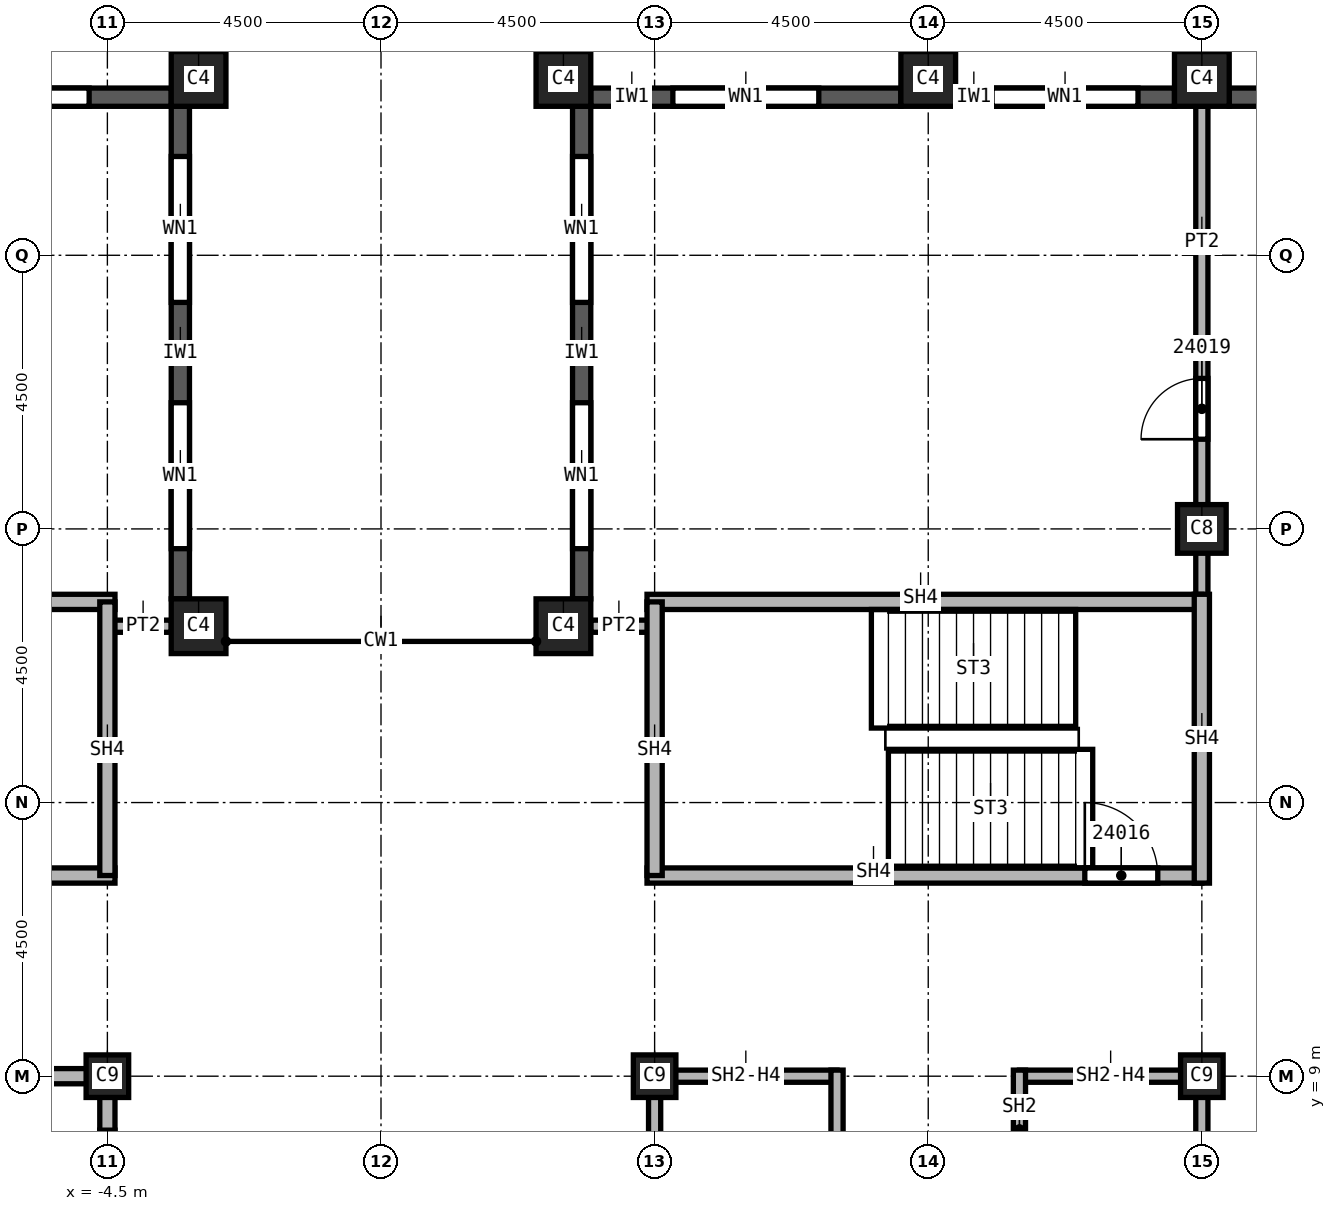
"""IFC4 building model, lengths in metres.
Left out: names, types, materials, properties, quantities, classifications, styles, units other than length and angle.
Written with IfcOpenShell. Run it as: python <this file> out.ifc"""

import sys

from ifc_helpers import new_model, si_unit, direction, frame, frame_2d, origin, origin_2d, place, context, subcontext, project, spatial, rectangle, extrude, element, fill, save


model = new_model("IFC4")
c1 = context("Model", 3, precision=1e-05, world=origin(), true_north=direction((0.0, 1.0)))
c2 = subcontext(c1, "Body", "Model", "MODEL_VIEW")
j1 = project(units=[si_unit("LENGTHUNIT", "METRE"), si_unit("PLANEANGLEUNIT", "RADIAN")], contexts=[c1])
p1 = place(None, origin())
s1 = spatial("IfcSite", under=j1, at=p1, CompositionType="ELEMENT")
p2 = place(p1, origin())
s2 = spatial("IfcBuilding", under=s1, at=p2, CompositionType="ELEMENT")
p3 = place(p2, frame((0.0, 0.0, 342.0)))
s3 = spatial("IfcBuildingStorey", under=s2, at=p3, CompositionType="ELEMENT", Elevation=342.0)
p4 = place(p3, frame((13.5, 18.0, 0.0), z_axis=(0.0, 0.0, 1.0), x_axis=(1.0, 0.0, 0.0)))
e1 = element("IfcColumn", 1, at=p4, inside=s3, PredefinedType="COLUMN", context=c2, shape_type="SweptSolid", body=[
    extrude(rectangle(XDim=0.8, YDim=0.8, at=origin_2d()), origin(), (0.0, 0.0, 1.0), 3.74),
])
for number, where, z_axis, x_axis in (
    (2, (4.5, 9.0, 0.0), (0.0, 0.0, 1.0), (1.0, 0.0, 0.0)),
    (3, (13.5, 9.0, 0.0), (0.0, 0.0, 1.0), (1.0, 0.0, 0.0)),
    (4, (-4.5, 9.0, 0.0), (0.0, 0.0, 1.0), (1.0, 0.0, 0.0)),
):
    element("IfcColumn", number, at=place(p3, frame(where, z_axis=z_axis, x_axis=x_axis)), inside=s3, PredefinedType="COLUMN", context=c2, shape_type="SweptSolid", body=[
        extrude(rectangle(XDim=0.7, YDim=0.7, at=origin_2d()), origin(), (0.0, 0.0, 1.0), 3.74),
    ])
for number, where, z_axis, x_axis in (
    (5, (3.0, 25.4, 0.0), (0.0, 0.0, 1.0), (1.0, 0.0, 0.0)),
    (6, (9.0, 25.4, 0.0), (0.0, 0.0, 1.0), (1.0, 0.0, 0.0)),
    (7, (13.5, 25.4, 0.0), (0.0, 0.0, 1.0), (1.0, 0.0, 0.0)),
    (8, (-3.0, 25.4, 0.0), (0.0, 0.0, 1.0), (1.0, 0.0, 0.0)),
    (9, (3.0, 16.4, 0.0), (0.0, 0.0, 1.0), (1.0, 0.0, 0.0)),
    (10, (-3.0, 16.4, 0.0), (0.0, 0.0, 1.0), (1.0, 0.0, 0.0)),
):
    element("IfcColumn", number, at=place(p3, frame(where, z_axis=z_axis, x_axis=x_axis)), inside=s3, PredefinedType="COLUMN", context=c2, shape_type="SweptSolid", body=[
        extrude(rectangle(XDim=0.9, YDim=0.9, at=origin_2d()), origin(), (0.0, 0.0, 1.0), 3.74),
    ])
p5 = place(p3, frame((17.55, 25.1, 0.0), z_axis=(0.0, 0.0, 1.0), x_axis=(-1.0, 0.0, 0.0)))
e11 = element("IfcWall", 11, at=p5, inside=s3, PredefinedType="SOLIDWALL", context=c2, shape_type="SweptSolid", body=[
    extrude(rectangle(XDim=3.6, YDim=0.3, at=frame_2d((1.8, 0.0))), origin(), (0.0, 0.0, 1.0), 3.14),
])
p6 = place(p5, frame((0.775, 0.0, 0.8)))
e12 = element("IfcOpeningElement", 12, at=p6, cuts=e11, PredefinedType="OPENING", context=c2, shape_type="SweptSolid", body=[
    extrude(rectangle(XDim=1.0, YDim=1.95, at=frame_2d((0.5, 0.975))), frame((0.0, 0.15, 0.0), z_axis=(0.0, -1.0, 0.0), x_axis=(1.0, 0.0, 0.0)), (0.0, 0.0, 1.0), 0.3),
])
p7 = place(p5, frame((2.375, 0.0, 0.8)))
e13 = element("IfcOpeningElement", 13, at=p7, cuts=e11, PredefinedType="OPENING", context=c2, shape_type="SweptSolid", body=[
    extrude(rectangle(XDim=0.6, YDim=1.95, at=frame_2d((0.3, 0.975))), frame((0.0, 0.15, 0.0), z_axis=(0.0, -1.0, 0.0), x_axis=(1.0, 0.0, 0.0)), (0.0, 0.0, 1.0), 0.3),
])
p8 = place(p3, frame((13.05, 25.1, 0.0), z_axis=(0.0, 0.0, 1.0), x_axis=(-1.0, 0.0, 0.0)))
e14 = element("IfcWall", 14, at=p8, inside=s3, PredefinedType="SOLIDWALL", context=c2, shape_type="SweptSolid", body=[
    extrude(rectangle(XDim=3.6, YDim=0.3, at=frame_2d((1.8, 0.0))), origin(), (0.0, 0.0, 1.0), 3.14),
])
p9 = place(p8, frame((0.6, 0.0, 0.8)))
e15 = element("IfcOpeningElement", 15, at=p9, cuts=e14, PredefinedType="OPENING", context=c2, shape_type="SweptSolid", body=[
    extrude(rectangle(XDim=2.4, YDim=1.95, at=frame_2d((1.2, 0.975))), frame((0.0, 0.15, 0.0), z_axis=(0.0, -1.0, 0.0), x_axis=(1.0, 0.0, 0.0)), (0.0, 0.0, 1.0), 0.3),
])
p10 = place(p3, frame((8.55, 25.1, 0.0), z_axis=(0.0, 0.0, 1.0), x_axis=(-1.0, 0.0, 0.0)))
e16 = element("IfcWall", 16, at=p10, inside=s3, PredefinedType="SOLIDWALL", context=c2, shape_type="SweptSolid", body=[
    extrude(rectangle(XDim=5.1, YDim=0.3, at=frame_2d((2.55, 0.0))), origin(), (0.0, 0.0, 1.0), 3.14),
])
p11 = place(p10, frame((1.35, 0.0, 0.8)))
e17 = element("IfcOpeningElement", 17, at=p11, cuts=e16, PredefinedType="OPENING", context=c2, shape_type="SweptSolid", body=[
    extrude(rectangle(XDim=2.4, YDim=1.95, at=frame_2d((1.2, 0.975))), frame((0.0, 0.15, 0.0), z_axis=(0.0, -1.0, 0.0), x_axis=(1.0, 0.0, 0.0)), (0.0, 0.0, 1.0), 0.3),
])
p12 = place(p3, frame((3.3, 24.95, 0.0), z_axis=(0.0, 0.0, 1.0), x_axis=(0.0, -1.0, 0.0)))
e18 = element("IfcWall", 18, at=p12, inside=s3, PredefinedType="SOLIDWALL", context=c2, shape_type="SweptSolid", body=[
    extrude(rectangle(XDim=8.1, YDim=0.3, at=frame_2d((4.05, 0.0))), origin(), (0.0, 0.0, 1.0), 3.14),
])
p13 = place(p12, frame((0.825, 0.0, 0.8)))
e19 = element("IfcOpeningElement", 19, at=p13, cuts=e18, PredefinedType="OPENING", context=c2, shape_type="SweptSolid", body=[
    extrude(rectangle(XDim=2.4, YDim=1.95, at=frame_2d((1.2, 0.975))), frame((0.0, 0.15, 0.0), z_axis=(0.0, -1.0, 0.0), x_axis=(1.0, 0.0, 0.0)), (0.0, 0.0, 1.0), 0.3),
])
p14 = place(p12, frame((4.875, 0.0, 0.8)))
e20 = element("IfcOpeningElement", 20, at=p14, cuts=e18, PredefinedType="OPENING", context=c2, shape_type="SweptSolid", body=[
    extrude(rectangle(XDim=2.4, YDim=1.95, at=frame_2d((1.2, 0.975))), frame((0.0, 0.15, 0.0), z_axis=(0.0, -1.0, 0.0), x_axis=(1.0, 0.0, 0.0)), (0.0, 0.0, 1.0), 0.3),
])
p15 = place(p3, frame((-3.3, 16.85, 0.0), z_axis=(0.0, 0.0, 1.0), x_axis=(0.0, 1.0, 0.0)))
e21 = element("IfcWall", 21, at=p15, inside=s3, PredefinedType="SOLIDWALL", context=c2, shape_type="SweptSolid", body=[
    extrude(rectangle(XDim=8.1, YDim=0.3, at=frame_2d((4.05, 0.0))), origin(), (0.0, 0.0, 1.0), 3.14),
])
p16 = place(p15, frame((0.825, 0.0, 0.8)))
e22 = element("IfcOpeningElement", 22, at=p16, cuts=e21, PredefinedType="OPENING", context=c2, shape_type="SweptSolid", body=[
    extrude(rectangle(XDim=2.4, YDim=1.95, at=frame_2d((1.2, 0.975))), frame((0.0, 0.15, 0.0), z_axis=(0.0, -1.0, 0.0), x_axis=(1.0, 0.0, 0.0)), (0.0, 0.0, 1.0), 0.3),
])
p17 = place(p15, frame((4.875, 0.0, 0.8)))
e23 = element("IfcOpeningElement", 23, at=p17, cuts=e21, PredefinedType="OPENING", context=c2, shape_type="SweptSolid", body=[
    extrude(rectangle(XDim=2.4, YDim=1.95, at=frame_2d((1.2, 0.975))), frame((0.0, 0.15, 0.0), z_axis=(0.0, -1.0, 0.0), x_axis=(1.0, 0.0, 0.0)), (0.0, 0.0, 1.0), 0.3),
])
p18 = place(p3, frame((-3.45, 25.1, 0.0), z_axis=(0.0, 0.0, 1.0), x_axis=(-1.0, 0.0, 0.0)))
e24 = element("IfcWall", 24, at=p18, inside=s3, PredefinedType="SOLIDWALL", context=c2, shape_type="SweptSolid", body=[
    extrude(rectangle(XDim=5.1, YDim=0.3, at=frame_2d((2.55, 0.0))), origin(), (0.0, 0.0, 1.0), 3.14),
])
p19 = place(p18, frame((1.35, 0.0, 0.8)))
e25 = element("IfcOpeningElement", 25, at=p19, cuts=e24, PredefinedType="OPENING", context=c2, shape_type="SweptSolid", body=[
    extrude(rectangle(XDim=2.4, YDim=1.95, at=frame_2d((1.2, 0.975))), frame((0.0, 0.15, 0.0), z_axis=(0.0, -1.0, 0.0), x_axis=(1.0, 0.0, 0.0)), (0.0, 0.0, 1.0), 0.3),
])
for number, where, z_axis, x_axis in (
    (26, (-4.5, 16.4, 0.0), (0.0, 0.0, 1.0), (1.0, 0.0, 0.0)),
    (27, (3.45, 16.4, 0.0), (0.0, 0.0, 1.0), (1.0, 0.0, 0.0)),
):
    element("IfcWall", number, at=place(p3, frame(where, z_axis=z_axis, x_axis=x_axis)), inside=s3, PredefinedType="PARTITIONING", context=c2, shape_type="SweptSolid", body=[
        extrude(rectangle(XDim=1.05, YDim=0.2, at=frame_2d((0.525, 0.0))), origin(), (0.0, 0.0, 1.0), 3.74),
    ])
p20 = place(p3, frame((13.5, 16.675, 0.0), z_axis=(0.0, 0.0, 1.0), x_axis=(0.0, 1.0, 0.0)))
e28 = element("IfcWall", 28, at=p20, inside=s3, PredefinedType="PARTITIONING", context=c2, shape_type="SweptSolid", body=[
    extrude(rectangle(XDim=8.275, YDim=0.2, at=frame_2d((4.137, 0.0))), origin(), (0.0, 0.0, 1.0), 3.74),
])
p21 = place(p20, frame((2.8, 0.0, 0.0)))
e29 = element("IfcOpeningElement", 29, at=p21, cuts=e28, PredefinedType="OPENING", context=c2, shape_type="SweptSolid", body=[
    extrude(rectangle(XDim=1.0, YDim=2.1, at=frame_2d((0.5, 1.05))), frame((0.0, 0.1, 0.0), z_axis=(0.0, -1.0, 0.0), x_axis=(1.0, 0.0, 0.0)), (0.0, 0.0, 1.0), 0.2),
])
p22 = place(p3, frame((4.5, -6.0, 0.0), z_axis=(0.0, 0.0, 1.0), x_axis=(0.0, 1.0, 0.0)))
e30 = element("IfcWall", 30, at=p22, inside=s3, PredefinedType="SOLIDWALL", context=c2, shape_type="SweptSolid", body=[
    extrude(rectangle(XDim=15.1, YDim=0.2, at=frame_2d((7.55, 0.0))), origin(), (0.0, 0.0, 1.0), 3.062),
])
p23 = place(p22, frame((1.6, 0.0, 0.0)))
e31 = element("IfcOpeningElement", 31, at=p23, cuts=e30, PredefinedType="OPENING", context=c2, shape_type="SweptSolid", body=[
    extrude(rectangle(XDim=1.1, YDim=2.1, at=frame_2d((0.55, 1.05))), frame((0.0, 0.1, 0.0), z_axis=(0.0, -1.0, 0.0), x_axis=(1.0, 0.0, 0.0)), (0.0, 0.0, 1.0), 0.2),
])
p24 = place(p22, frame((8.2, 0.0, 0.0)))
e32 = element("IfcOpeningElement", 32, at=p24, cuts=e30, PredefinedType="OPENING", context=c2, shape_type="SweptSolid", body=[
    extrude(rectangle(XDim=1.1, YDim=2.1, at=frame_2d((0.55, 1.05))), frame((0.0, 0.1, 0.0), z_axis=(0.0, -1.0, 0.0), x_axis=(1.0, 0.0, 0.0)), (0.0, 0.0, 1.0), 0.2),
])
p25 = place(p3, frame((4.5, 9.0, 0.0), z_axis=(0.0, 0.0, 1.0), x_axis=(1.0, 0.0, 0.0)))
e33 = element("IfcWall", 33, at=p25, inside=s3, PredefinedType="SOLIDWALL", context=c2, shape_type="SweptSolid", body=[
    extrude(rectangle(XDim=3.0, YDim=0.2, at=frame_2d((1.5, 0.0))), origin(), (0.0, 0.0, 1.0), 3.062),
])
p26 = place(p3, frame((7.5, 9.1, 0.0), z_axis=(0.0, 0.0, 1.0), x_axis=(0.0, -1.0, 0.0)))
e34 = element("IfcWall", 34, at=p26, inside=s3, PredefinedType="SOLIDWALL", context=c2, shape_type="SweptSolid", body=[
    extrude(rectangle(XDim=6.225, YDim=0.2, at=frame_2d((3.113, 0.0))), origin(), (0.0, 0.0, 1.0), 3.74),
])
p27 = place(p3, frame((10.5, 9.0, 0.0), z_axis=(0.0, 0.0, 1.0), x_axis=(1.0, 0.0, 0.0)))
e35 = element("IfcWall", 35, at=p27, inside=s3, PredefinedType="SOLIDWALL", context=c2, shape_type="SweptSolid", body=[
    extrude(rectangle(XDim=3.0, YDim=0.2, at=frame_2d((1.5, 0.0))), origin(), (0.0, 0.0, 1.0), 3.062),
])
p28 = place(p3, frame((10.5, 9.1, 0.0), z_axis=(0.0, 0.0, 1.0), x_axis=(0.0, -1.0, 0.0)))
e36 = element("IfcWall", 36, at=p28, inside=s3, PredefinedType="SOLIDWALL", context=c2, shape_type="SweptSolid", body=[
    extrude(rectangle(XDim=3.225, YDim=0.2, at=frame_2d((1.613, 0.0))), origin(), (0.0, 0.0, 1.0), 3.74),
])
p29 = place(p28, frame((1.75, 0.0, 0.0)))
e37 = element("IfcOpeningElement", 37, at=p29, cuts=e36, PredefinedType="OPENING", context=c2, shape_type="SweptSolid", body=[
    extrude(rectangle(XDim=1.1, YDim=2.1, at=frame_2d((0.55, 1.05))), frame((0.0, 0.1, 0.0), z_axis=(0.0, -1.0, 0.0), x_axis=(1.0, 0.0, 0.0)), (0.0, 0.0, 1.0), 0.2),
])
p30 = place(p3, frame((13.5, 9.1, 0.0), z_axis=(0.0, 0.0, 1.0), x_axis=(0.0, -1.0, 0.0)))
e38 = element("IfcWall", 38, at=p30, inside=s3, PredefinedType="SOLIDWALL", context=c2, shape_type="SweptSolid", body=[
    extrude(rectangle(XDim=3.1, YDim=0.2, at=frame_2d((1.55, 0.0))), origin(), (0.0, 0.0, 1.0), 3.062),
])
p31 = place(p3, frame((-7.5, 9.0, 0.0), z_axis=(0.0, 0.0, 1.0), x_axis=(1.0, 0.0, 0.0)))
e39 = element("IfcWall", 39, at=p31, inside=s3, PredefinedType="SOLIDWALL", context=c2, shape_type="SweptSolid", body=[
    extrude(rectangle(XDim=3.0, YDim=0.25, at=frame_2d((1.5, 0.0))), origin(), (0.0, 0.0, 1.0), 3.062),
])
p32 = place(p3, frame((-4.5, 9.125, 0.0), z_axis=(0.0, 0.0, 1.0), x_axis=(0.0, -1.0, 0.0)))
e40 = element("IfcWall", 40, at=p32, inside=s3, PredefinedType="SOLIDWALL", context=c2, shape_type="SweptSolid", body=[
    extrude(rectangle(XDim=3.125, YDim=0.25, at=frame_2d((1.562, 0.0))), origin(), (0.0, 0.0, 1.0), 3.062),
])
p33 = place(p32, frame((1.012, 0.0, 0.0)))
e41 = element("IfcOpeningElement", 41, at=p33, cuts=e40, PredefinedType="OPENING", context=c2, shape_type="SweptSolid", body=[
    extrude(rectangle(XDim=1.1, YDim=2.1, at=frame_2d((0.55, 1.05))), frame((0.0, 0.125, 0.0), z_axis=(0.0, -1.0, 0.0), x_axis=(1.0, 0.0, 0.0)), (0.0, 0.0, 1.0), 0.25),
])
p34 = place(p3, frame((-13.5, 12.3, 0.0), z_axis=(0.0, 0.0, 1.0), x_axis=(1.0, 0.0, 0.0)))
e42 = element("IfcWall", 42, at=p34, inside=s3, PredefinedType="SOLIDWALL", context=c2, shape_type="SweptSolid", body=[
    extrude(rectangle(XDim=9.125, YDim=0.25, at=frame_2d((4.562, 0.0))), origin(), (0.0, 0.0, 1.0), 3.74),
])
p35 = place(p34, frame((0.6, 0.0, 0.0)))
e43 = element("IfcOpeningElement", 43, at=p35, cuts=e42, PredefinedType="OPENING", context=c2, shape_type="SweptSolid", body=[
    extrude(rectangle(XDim=1.2, YDim=2.1, at=frame_2d((0.6, 1.05))), frame((0.0, 0.125, 0.0), z_axis=(0.0, -1.0, 0.0), x_axis=(1.0, 0.0, 0.0)), (0.0, 0.0, 1.0), 0.25),
])
p36 = place(p3, frame((-13.5, 16.8, 0.0), z_axis=(0.0, 0.0, 1.0), x_axis=(1.0, 0.0, 0.0)))
e44 = element("IfcWall", 44, at=p36, inside=s3, PredefinedType="SOLIDWALL", context=c2, shape_type="SweptSolid", body=[
    extrude(rectangle(XDim=9.125, YDim=0.25, at=frame_2d((4.562, 0.0))), origin(), (0.0, 0.0, 1.0), 3.74),
])
p37 = place(p3, frame((-4.5, 16.8, 0.0), z_axis=(0.0, 0.0, 1.0), x_axis=(0.0, -1.0, 0.0)))
e45 = element("IfcWall", 45, at=p37, inside=s3, PredefinedType="SOLIDWALL", context=c2, shape_type="SweptSolid", body=[
    extrude(rectangle(XDim=4.5, YDim=0.25, at=frame_2d((2.25, 0.0))), origin(), (0.0, 0.0, 1.0), 3.74),
])
p38 = place(p3, frame((4.375, 12.3, 0.0), z_axis=(0.0, 0.0, 1.0), x_axis=(1.0, 0.0, 0.0)))
e46 = element("IfcWall", 46, at=p38, inside=s3, PredefinedType="SOLIDWALL", context=c2, shape_type="SweptSolid", body=[
    extrude(rectangle(XDim=9.125, YDim=0.25, at=frame_2d((4.562, 0.0))), origin(), (0.0, 0.0, 1.0), 3.74),
])
p39 = place(p38, frame((7.2, 0.0, 0.0)))
e47 = element("IfcOpeningElement", 47, at=p39, cuts=e46, PredefinedType="OPENING", context=c2, shape_type="SweptSolid", body=[
    extrude(rectangle(XDim=1.2, YDim=2.1, at=frame_2d((0.6, 1.05))), frame((0.0, 0.125, 0.0), z_axis=(0.0, -1.0, 0.0), x_axis=(1.0, 0.0, 0.0)), (0.0, 0.0, 1.0), 0.25),
])
p40 = place(p3, frame((4.375, 16.8, 0.0), z_axis=(0.0, 0.0, 1.0), x_axis=(1.0, 0.0, 0.0)))
e48 = element("IfcWall", 48, at=p40, inside=s3, PredefinedType="SOLIDWALL", context=c2, shape_type="SweptSolid", body=[
    extrude(rectangle(XDim=9.125, YDim=0.25, at=frame_2d((4.562, 0.0))), origin(), (0.0, 0.0, 1.0), 3.74),
])
p41 = place(p3, frame((4.5, 12.3, 0.0), z_axis=(0.0, 0.0, 1.0), x_axis=(0.0, 1.0, 0.0)))
e49 = element("IfcWall", 49, at=p41, inside=s3, PredefinedType="SOLIDWALL", context=c2, shape_type="SweptSolid", body=[
    extrude(rectangle(XDim=4.5, YDim=0.25, at=frame_2d((2.25, 0.0))), origin(), (0.0, 0.0, 1.0), 3.74),
])
p42 = place(p3, frame((13.5, 12.175, 0.0), z_axis=(0.0, 0.0, 1.0), x_axis=(0.0, 1.0, 0.0)))
e50 = element("IfcWall", 50, at=p42, inside=s3, PredefinedType="SOLIDWALL", context=c2, shape_type="SweptSolid", body=[
    extrude(rectangle(XDim=4.75, YDim=0.25, at=frame_2d((2.375, 0.0))), origin(), (0.0, 0.0, 1.0), 3.74),
])
p43 = place(p9, origin())
e51 = element("IfcWindow", 51, at=p43, inside=s3, PartitioningType="SINGLE_PANEL", PredefinedType="WINDOW", context=c2, shape_type="SweptSolid", body=[
    extrude(rectangle(XDim=2.4, YDim=1.95, at=frame_2d((1.2, 0.975))), frame((0.0, 0.03, 0.0), z_axis=(0.0, -1.0, 0.0), x_axis=(1.0, 0.0, 0.0)), (0.0, 0.0, 1.0), 0.06),
])
fill(e15, e51)
p44 = place(p11, origin())
e52 = element("IfcWindow", 52, at=p44, inside=s3, PartitioningType="SINGLE_PANEL", PredefinedType="WINDOW", context=c2, shape_type="SweptSolid", body=[
    extrude(rectangle(XDim=2.4, YDim=1.95, at=frame_2d((1.2, 0.975))), frame((0.0, 0.03, 0.0), z_axis=(0.0, -1.0, 0.0), x_axis=(1.0, 0.0, 0.0)), (0.0, 0.0, 1.0), 0.06),
])
fill(e17, e52)
p45 = place(p13, origin())
e53 = element("IfcWindow", 53, at=p45, inside=s3, PartitioningType="SINGLE_PANEL", PredefinedType="WINDOW", context=c2, shape_type="SweptSolid", body=[
    extrude(rectangle(XDim=2.4, YDim=1.95, at=frame_2d((1.2, 0.975))), frame((0.0, 0.03, 0.0), z_axis=(0.0, -1.0, 0.0), x_axis=(1.0, 0.0, 0.0)), (0.0, 0.0, 1.0), 0.06),
])
fill(e19, e53)
p46 = place(p14, origin())
e54 = element("IfcWindow", 54, at=p46, inside=s3, PartitioningType="SINGLE_PANEL", PredefinedType="WINDOW", context=c2, shape_type="SweptSolid", body=[
    extrude(rectangle(XDim=2.4, YDim=1.95, at=frame_2d((1.2, 0.975))), frame((0.0, 0.03, 0.0), z_axis=(0.0, -1.0, 0.0), x_axis=(1.0, 0.0, 0.0)), (0.0, 0.0, 1.0), 0.06),
])
fill(e20, e54)
p47 = place(p16, origin())
e55 = element("IfcWindow", 55, at=p47, inside=s3, PartitioningType="SINGLE_PANEL", PredefinedType="WINDOW", context=c2, shape_type="SweptSolid", body=[
    extrude(rectangle(XDim=2.4, YDim=1.95, at=frame_2d((1.2, 0.975))), frame((0.0, 0.03, 0.0), z_axis=(0.0, -1.0, 0.0), x_axis=(1.0, 0.0, 0.0)), (0.0, 0.0, 1.0), 0.06),
])
fill(e22, e55)
p48 = place(p17, origin())
e56 = element("IfcWindow", 56, at=p48, inside=s3, PartitioningType="SINGLE_PANEL", PredefinedType="WINDOW", context=c2, shape_type="SweptSolid", body=[
    extrude(rectangle(XDim=2.4, YDim=1.95, at=frame_2d((1.2, 0.975))), frame((0.0, 0.03, 0.0), z_axis=(0.0, -1.0, 0.0), x_axis=(1.0, 0.0, 0.0)), (0.0, 0.0, 1.0), 0.06),
])
fill(e23, e56)
p49 = place(p19, origin())
e57 = element("IfcWindow", 57, at=p49, inside=s3, PartitioningType="SINGLE_PANEL", PredefinedType="WINDOW", context=c2, shape_type="SweptSolid", body=[
    extrude(rectangle(XDim=2.4, YDim=1.95, at=frame_2d((1.2, 0.975))), frame((0.0, 0.03, 0.0), z_axis=(0.0, -1.0, 0.0), x_axis=(1.0, 0.0, 0.0)), (0.0, 0.0, 1.0), 0.06),
])
fill(e25, e57)
p50 = place(p39, origin())
e58 = element("IfcDoor", 58, at=p50, inside=s3, OperationType="SINGLE_SWING_LEFT", PredefinedType="DOOR", context=c2, shape_type="SweptSolid", body=[
    extrude(rectangle(XDim=1.2, YDim=2.1, at=frame_2d((0.6, 1.05))), frame((0.0, 0.025, 0.0), z_axis=(0.0, -1.0, 0.0), x_axis=(1.0, 0.0, 0.0)), (0.0, 0.0, 1.0), 0.05),
])
fill(e47, e58)
p51 = place(p21, origin())
e59 = element("IfcDoor", 59, at=p51, inside=s3, OperationType="SINGLE_SWING_RIGHT", PredefinedType="DOOR", context=c2, shape_type="SweptSolid", body=[
    extrude(rectangle(XDim=1.0, YDim=2.1, at=frame_2d((0.5, 1.05))), frame((0.0, 0.025, 0.0), z_axis=(0.0, -1.0, 0.0), x_axis=(1.0, 0.0, 0.0)), (0.0, 0.0, 1.0), 0.05),
])
fill(e29, e59)
p52 = place(p33, origin())
e60 = element("IfcDoor", 60, at=p52, inside=s3, OperationType="SLIDING_TO_LEFT", PredefinedType="DOOR", context=c2, shape_type="SweptSolid", body=[
    extrude(rectangle(XDim=1.1, YDim=2.1, at=frame_2d((0.55, 1.05))), frame((0.0, 0.025, 0.0), z_axis=(0.0, -1.0, 0.0), x_axis=(1.0, 0.0, 0.0)), (0.0, 0.0, 1.0), 0.05),
])
fill(e41, e60)
save(model, sys.argv[1])
